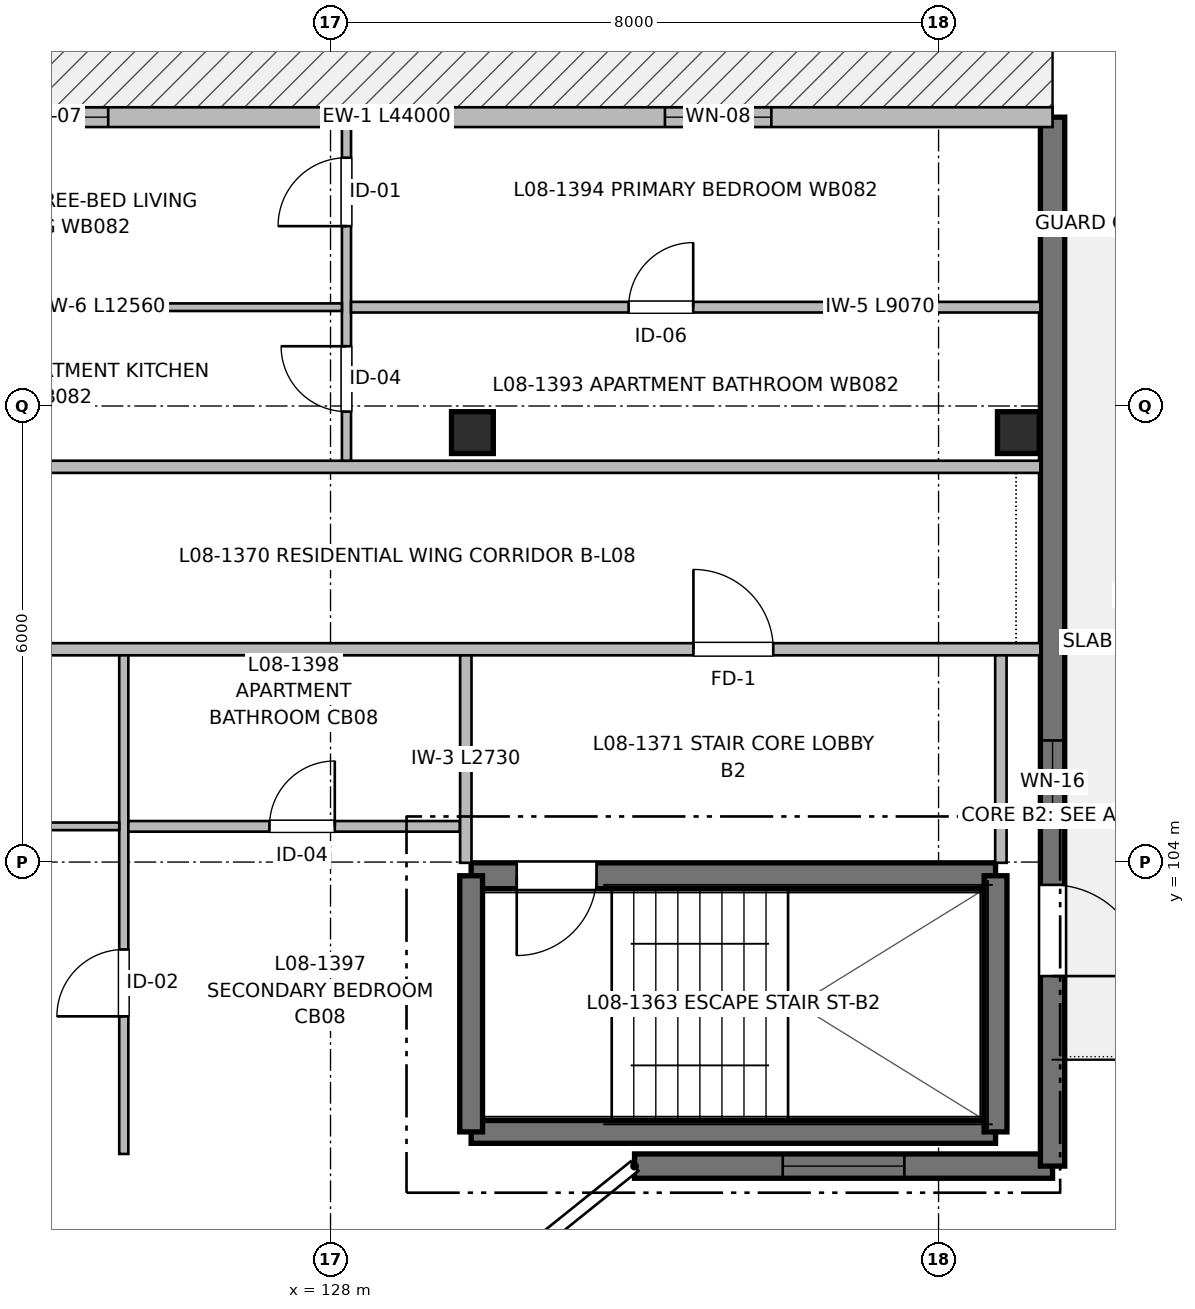
"""IFC4 building model, lengths in metres.
Left out: names, types, materials, properties, quantities, classifications, styles, units other than length and angle.
Written with IfcOpenShell. Run it as: python <this file> out.ifc"""

import sys

from ifc_helpers import new_model, si_unit, direction, frame, frame_2d, origin, origin_2d, place, context, subcontext, project, spatial, rectangle, extrude, element, fill, save


model = new_model("IFC4")
c1 = context("Model", 3, precision=1e-05, world=origin(), true_north=direction((0.0, 1.0)))
c2 = subcontext(c1, "Body", "Model", "MODEL_VIEW")
j1 = project(units=[si_unit("LENGTHUNIT", "METRE"), si_unit("PLANEANGLEUNIT", "RADIAN")], contexts=[c1])
p1 = place(None, origin())
s1 = spatial("IfcSite", under=j1, at=p1, CompositionType="ELEMENT")
p2 = place(p1, origin())
s2 = spatial("IfcBuilding", under=s1, at=p2, CompositionType="ELEMENT")
p3 = place(p2, frame((0.0, 0.0, 26.56)))
s3 = spatial("IfcBuildingStorey", under=s2, at=p3, CompositionType="ELEMENT", Elevation=26.56)
for number, where, z_axis, x_axis in (
    (1, (129.867, 109.65, 0.0), (0.0, 0.0, 1.0), (1.0, 0.0, 0.0)),
    (2, (137.05, 109.65, 0.0), (0.0, 0.0, 1.0), (1.0, 0.0, 0.0)),
):
    element("IfcColumn", number, at=place(p3, frame(where, z_axis=z_axis, x_axis=x_axis)), inside=s3, PredefinedType="COLUMN", context=c2, shape_type="SweptSolid", body=[
        extrude(rectangle(XDim=0.55, YDim=0.55, at=origin_2d()), origin(), (0.0, 0.0, 1.0), 3.2),
    ])
p4 = place(p3, frame((129.85, 100.45, 0.0), z_axis=(0.0, 0.0, 1.0), x_axis=(1.0, 0.0, 0.0)))
e3 = element("IfcWall", 3, at=p4, inside=s3, PredefinedType="SHEAR", context=c2, shape_type="SweptSolid", body=[
    extrude(rectangle(XDim=6.9, YDim=0.3, at=frame_2d((3.45, 0.0))), origin(), (0.0, 0.0, 1.0), 3.2),
])
p5 = place(p3, frame((136.75, 103.82, 0.0), z_axis=(0.0, 0.0, 1.0), x_axis=(-1.0, 0.0, 0.0)))
e4 = element("IfcWall", 4, at=p5, inside=s3, PredefinedType="SHEAR", context=c2, shape_type="SweptSolid", body=[
    extrude(rectangle(XDim=6.9, YDim=0.34, at=frame_2d((3.45, 0.0))), origin(), (0.0, 0.0, 1.0), 3.2),
])
p6 = place(p5, frame((5.25, 0.0, 0.0)))
e5 = element("IfcOpeningElement", 5, at=p6, cuts=e4, PredefinedType="OPENING", context=c2, shape_type="SweptSolid", body=[
    extrude(rectangle(XDim=1.05, YDim=2.15, at=frame_2d((0.525, 1.075))), frame((0.0, 0.18, 0.0), z_axis=(0.0, -1.0, 0.0), x_axis=(1.0, 0.0, 0.0)), (0.0, 0.0, 1.0), 0.36),
])
for number, where, z_axis, x_axis in (
    (6, (129.85, 103.82, 0.0), (0.0, 0.0, 1.0), (0.0, -1.0, 0.0)),
    (7, (136.75, 100.45, 0.0), (0.0, 0.0, 1.0), (0.0, 1.0, 0.0)),
):
    element("IfcWall", number, at=place(p3, frame(where, z_axis=z_axis, x_axis=x_axis)), inside=s3, PredefinedType="SHEAR", context=c2, shape_type="SweptSolid", body=[
        extrude(rectangle(XDim=3.37, YDim=0.3, at=frame_2d((1.685, 0.0))), origin(), (0.0, 0.0, 1.0), 3.2),
    ])
p7 = place(p3, frame((137.5, 100.0, 0.0), z_axis=(0.0, 0.0, 1.0), x_axis=(-1.0, 0.0, 0.0)))
e8 = element("IfcWall", 8, at=p7, inside=s3, PredefinedType="SHEAR", context=c2, shape_type="SweptSolid", body=[
    extrude(rectangle(XDim=5.5, YDim=0.32, at=frame_2d((2.75, 0.0))), origin(), (0.0, 0.0, 1.0), 2.98),
])
p8 = place(p7, frame((1.95, 0.0, 0.77)))
e9 = element("IfcOpeningElement", 9, at=p8, cuts=e8, PredefinedType="OPENING", context=c2, shape_type="SweptSolid", body=[
    extrude(rectangle(XDim=1.6, YDim=1.45, at=frame_2d((0.8, 0.725))), frame((0.0, 0.17, 0.0), z_axis=(0.0, -1.0, 0.0), x_axis=(1.0, 0.0, 0.0)), (0.0, 0.0, 1.0), 0.34),
])
p9 = place(p3, frame((137.5, 113.8, 0.0), z_axis=(0.0, 0.0, 1.0), x_axis=(0.0, -1.0, 0.0)))
e10 = element("IfcWall", 10, at=p9, inside=s3, PredefinedType="SHEAR", context=c2, shape_type="SweptSolid", body=[
    extrude(rectangle(XDim=13.8, YDim=0.32, at=frame_2d((6.9, 0.0))), origin(), (0.0, 0.0, 1.0), 2.98),
])
p10 = place(p9, frame((10.1, 0.0, 0.0)))
e11 = element("IfcOpeningElement", 11, at=p10, cuts=e10, PredefinedType="OPENING", context=c2, shape_type="SweptSolid", body=[
    extrude(rectangle(XDim=1.2, YDim=2.2, at=frame_2d((0.6, 1.1))), frame((0.0, 0.17, 0.0), z_axis=(0.0, -1.0, 0.0), x_axis=(1.0, 0.0, 0.0)), (0.0, 0.0, 1.0), 0.34),
])
p11 = place(p9, frame((8.2, 0.0, 0.62)))
e12 = element("IfcOpeningElement", 12, at=p11, cuts=e10, PredefinedType="OPENING", context=c2, shape_type="SweptSolid", body=[
    extrude(rectangle(XDim=1.1, YDim=1.6, at=frame_2d((0.55, 0.8))), frame((0.0, 0.17, 0.0), z_axis=(0.0, -1.0, 0.0), x_axis=(1.0, 0.0, 0.0)), (0.0, 0.0, 1.0), 0.34),
])
p12 = place(p3, frame((93.5, 113.8, 0.0), z_axis=(0.0, 0.0, 1.0), x_axis=(1.0, 0.0, 0.0)))
e13 = element("IfcWall", 13, at=p12, inside=s3, PredefinedType="SOLIDWALL", context=c2, shape_type="SweptSolid", body=[
    extrude(rectangle(XDim=44.0, YDim=0.26, at=frame_2d((22.0, 0.0))), origin(), (0.0, 0.0, 1.0), 2.98),
])
p13 = place(p12, frame((5.5, 0.0, 0.0)))
e14 = element("IfcOpeningElement", 14, at=p13, cuts=e13, PredefinedType="OPENING", context=c2, shape_type="SweptSolid", body=[
    extrude(rectangle(XDim=1.35, YDim=2.2, at=frame_2d((0.675, 1.1))), frame((0.0, 0.14, 0.0), z_axis=(0.0, -1.0, 0.0), x_axis=(1.0, 0.0, 0.0)), (0.0, 0.0, 1.0), 0.28),
])
p14 = place(p12, frame((3.6, 0.0, 0.77)))
e15 = element("IfcOpeningElement", 15, at=p14, cuts=e13, PredefinedType="OPENING", context=c2, shape_type="SweptSolid", body=[
    extrude(rectangle(XDim=1.6, YDim=1.45, at=frame_2d((0.8, 0.725))), frame((0.0, 0.14, 0.0), z_axis=(0.0, -1.0, 0.0), x_axis=(1.0, 0.0, 0.0)), (0.0, 0.0, 1.0), 0.28),
])
p15 = place(p12, frame((13.3, 0.0, 0.72)))
e16 = element("IfcOpeningElement", 16, at=p15, cuts=e13, PredefinedType="OPENING", context=c2, shape_type="SweptSolid", body=[
    extrude(rectangle(XDim=2.4, YDim=1.5, at=frame_2d((1.2, 0.75))), frame((0.0, 0.14, 0.0), z_axis=(0.0, -1.0, 0.0), x_axis=(1.0, 0.0, 0.0)), (0.0, 0.0, 1.0), 0.28),
])
p16 = place(p12, frame((22.55, 0.0, 0.82)))
e17 = element("IfcOpeningElement", 17, at=p16, cuts=e13, PredefinedType="OPENING", context=c2, shape_type="SweptSolid", body=[
    extrude(rectangle(XDim=1.5, YDim=1.4, at=frame_2d((0.75, 0.7))), frame((0.0, 0.14, 0.0), z_axis=(0.0, -1.0, 0.0), x_axis=(1.0, 0.0, 0.0)), (0.0, 0.0, 1.0), 0.28),
])
p17 = place(p12, frame((30.025, 0.0, 0.82)))
e18 = element("IfcOpeningElement", 18, at=p17, cuts=e13, PredefinedType="OPENING", context=c2, shape_type="SweptSolid", body=[
    extrude(rectangle(XDim=1.55, YDim=1.4, at=frame_2d((0.775, 0.7))), frame((0.0, 0.14, 0.0), z_axis=(0.0, -1.0, 0.0), x_axis=(1.0, 0.0, 0.0)), (0.0, 0.0, 1.0), 0.28),
])
p18 = place(p12, frame((38.9, 0.0, 0.87)))
e19 = element("IfcOpeningElement", 19, at=p18, cuts=e13, PredefinedType="OPENING", context=c2, shape_type="SweptSolid", body=[
    extrude(rectangle(XDim=1.4, YDim=1.35, at=frame_2d((0.7, 0.675))), frame((0.0, 0.14, 0.0), z_axis=(0.0, -1.0, 0.0), x_axis=(1.0, 0.0, 0.0)), (0.0, 0.0, 1.0), 0.28),
])
p19 = place(p3, frame((113.2, 106.8, 0.0), z_axis=(0.0, 0.0, 1.0), x_axis=(1.0, 0.0, 0.0)))
e20 = element("IfcWall", 20, at=p19, inside=s3, PredefinedType="PARTITIONING", context=c2, shape_type="SweptSolid", body=[
    extrude(rectangle(XDim=24.14, YDim=0.16, at=frame_2d((12.07, 0.0))), origin(), (0.0, 0.0, 1.0), 2.935),
])
p20 = place(p19, frame((19.575, 0.0, 0.0)))
e21 = element("IfcOpeningElement", 21, at=p20, cuts=e20, PredefinedType="OPENING", context=c2, shape_type="SweptSolid", body=[
    extrude(rectangle(XDim=1.05, YDim=2.15, at=frame_2d((0.525, 1.075))), frame((0.0, 0.09, 0.0), z_axis=(0.0, -1.0, 0.0), x_axis=(1.0, 0.0, 0.0)), (0.0, 0.0, 1.0), 0.18),
])
p21 = place(p19, frame((8.995, 0.0, 0.0)))
e22 = element("IfcOpeningElement", 22, at=p21, cuts=e20, PredefinedType="OPENING", context=c2, shape_type="SweptSolid", body=[
    extrude(rectangle(XDim=0.98, YDim=2.15, at=frame_2d((0.49, 1.075))), frame((0.0, 0.09, 0.0), z_axis=(0.0, -1.0, 0.0), x_axis=(1.0, 0.0, 0.0)), (0.0, 0.0, 1.0), 0.18),
])
p22 = place(p3, frame((93.66, 109.2, 0.0), z_axis=(0.0, 0.0, 1.0), x_axis=(1.0, 0.0, 0.0)))
e23 = element("IfcWall", 23, at=p22, inside=s3, PredefinedType="PARTITIONING", context=c2, shape_type="SweptSolid", body=[
    extrude(rectangle(XDim=43.68, YDim=0.16, at=frame_2d((21.84, 0.0))), origin(), (0.0, 0.0, 1.0), 2.935),
])
p23 = place(p22, frame((5.815, 0.0, 0.0)))
e24 = element("IfcOpeningElement", 24, at=p23, cuts=e23, PredefinedType="OPENING", context=c2, shape_type="SweptSolid", body=[
    extrude(rectangle(XDim=0.98, YDim=2.15, at=frame_2d((0.49, 1.075))), frame((0.0, 0.09, 0.0), z_axis=(0.0, -1.0, 0.0), x_axis=(1.0, 0.0, 0.0)), (0.0, 0.0, 1.0), 0.18),
])
p24 = place(p22, frame((27.35, 0.0, 0.0)))
e25 = element("IfcOpeningElement", 25, at=p24, cuts=e23, PredefinedType="OPENING", context=c2, shape_type="SweptSolid", body=[
    extrude(rectangle(XDim=0.98, YDim=2.15, at=frame_2d((0.49, 1.075))), frame((0.0, 0.09, 0.0), z_axis=(0.0, -1.0, 0.0), x_axis=(1.0, 0.0, 0.0)), (0.0, 0.0, 1.0), 0.18),
])
for number, where, z_axis, x_axis in (
    (26, (129.78, 103.99, 0.0), (0.0, 0.0, 1.0), (0.0, 1.0, 0.0)),
    (27, (136.82, 103.99, 0.0), (0.0, 0.0, 1.0), (0.0, 1.0, 0.0)),
):
    element("IfcWall", number, at=place(p3, frame(where, z_axis=z_axis, x_axis=x_axis)), inside=s3, PredefinedType="PARTITIONING", context=c2, shape_type="SweptSolid", body=[
        extrude(rectangle(XDim=2.73, YDim=0.15, at=frame_2d((1.365, 0.0))), origin(), (0.0, 0.0, 1.0), 2.935),
    ])
p25 = place(p3, frame((128.21, 109.28, 0.0), z_axis=(0.0, 0.0, 1.0), x_axis=(0.0, 1.0, 0.0)))
e28 = element("IfcWall", 28, at=p25, inside=s3, PredefinedType="PARTITIONING", context=c2, shape_type="SweptSolid", body=[
    extrude(rectangle(XDim=4.39, YDim=0.12, at=frame_2d((2.195, 0.0))), origin(), (0.0, 0.0, 1.0), 2.935),
])
p26 = place(p25, frame((0.646, 0.0, 0.0)))
e29 = element("IfcOpeningElement", 29, at=p26, cuts=e28, PredefinedType="OPENING", context=c2, shape_type="SweptSolid", body=[
    extrude(rectangle(XDim=0.86, YDim=2.1, at=frame_2d((0.43, 1.05))), frame((0.0, 0.07, 0.0), z_axis=(0.0, -1.0, 0.0), x_axis=(1.0, 0.0, 0.0)), (0.0, 0.0, 1.0), 0.14),
])
p27 = place(p25, frame((3.086, 0.0, 0.0)))
e30 = element("IfcOpeningElement", 30, at=p27, cuts=e28, PredefinedType="OPENING", context=c2, shape_type="SweptSolid", body=[
    extrude(rectangle(XDim=0.9, YDim=2.1, at=frame_2d((0.45, 1.05))), frame((0.0, 0.07, 0.0), z_axis=(0.0, -1.0, 0.0), x_axis=(1.0, 0.0, 0.0)), (0.0, 0.0, 1.0), 0.14),
])
p28 = place(p3, frame((128.27, 111.3, 0.0), z_axis=(0.0, 0.0, 1.0), x_axis=(1.0, 0.0, 0.0)))
e31 = element("IfcWall", 31, at=p28, inside=s3, PredefinedType="PARTITIONING", context=c2, shape_type="SweptSolid", body=[
    extrude(rectangle(XDim=9.07, YDim=0.14, at=frame_2d((4.535, 0.0))), origin(), (0.0, 0.0, 1.0), 2.935),
])
p29 = place(p28, frame((3.652, 0.0, 0.0)))
e32 = element("IfcOpeningElement", 32, at=p29, cuts=e31, PredefinedType="OPENING", context=c2, shape_type="SweptSolid", body=[
    extrude(rectangle(XDim=0.85, YDim=2.05, at=frame_2d((0.425, 1.025))), frame((0.0, 0.08, 0.0), z_axis=(0.0, -1.0, 0.0), x_axis=(1.0, 0.0, 0.0)), (0.0, 0.0, 1.0), 0.16),
])
p30 = place(p3, frame((115.59, 111.3, 0.0), z_axis=(0.0, 0.0, 1.0), x_axis=(1.0, 0.0, 0.0)))
e33 = element("IfcWall", 33, at=p30, inside=s3, PredefinedType="PARTITIONING", context=c2, shape_type="SweptSolid", body=[
    extrude(rectangle(XDim=12.56, YDim=0.1, at=frame_2d((6.28, 0.0))), origin(), (0.0, 0.0, 1.0), 2.935),
])
p31 = place(p30, frame((5.048, 0.0, 0.0)))
e34 = element("IfcOpeningElement", 34, at=p31, cuts=e33, PredefinedType="OPENING", context=c2, shape_type="SweptSolid", body=[
    extrude(rectangle(XDim=0.92, YDim=2.1, at=frame_2d((0.46, 1.05))), frame((0.0, 0.06, 0.0), z_axis=(0.0, -1.0, 0.0), x_axis=(1.0, 0.0, 0.0)), (0.0, 0.0, 1.0), 0.12),
])
p32 = place(p3, frame((125.28, 100.16, 0.0), z_axis=(0.0, 0.0, 1.0), x_axis=(0.0, 1.0, 0.0)))
e35 = element("IfcWall", 35, at=p32, inside=s3, PredefinedType="PARTITIONING", context=c2, shape_type="SweptSolid", body=[
    extrude(rectangle(XDim=6.56, YDim=0.12, at=frame_2d((3.28, 0.0))), origin(), (0.0, 0.0, 1.0), 2.935),
])
p33 = place(p32, frame((1.81, 0.0, 0.0)))
e36 = element("IfcOpeningElement", 36, at=p33, cuts=e35, PredefinedType="OPENING", context=c2, shape_type="SweptSolid", body=[
    extrude(rectangle(XDim=0.88, YDim=2.1, at=frame_2d((0.44, 1.05))), frame((0.0, 0.07, 0.0), z_axis=(0.0, -1.0, 0.0), x_axis=(1.0, 0.0, 0.0)), (0.0, 0.0, 1.0), 0.14),
])
p34 = place(p3, frame((125.34, 104.47, 0.0), z_axis=(0.0, 0.0, 1.0), x_axis=(1.0, 0.0, 0.0)))
e37 = element("IfcWall", 37, at=p34, inside=s3, PredefinedType="PARTITIONING", context=c2, shape_type="SweptSolid", body=[
    extrude(rectangle(XDim=4.36, YDim=0.14, at=frame_2d((2.18, 0.0))), origin(), (0.0, 0.0, 1.0), 2.935),
])
p35 = place(p34, frame((1.856, 0.0, 0.0)))
e38 = element("IfcOpeningElement", 38, at=p35, cuts=e37, PredefinedType="OPENING", context=c2, shape_type="SweptSolid", body=[
    extrude(rectangle(XDim=0.86, YDim=2.1, at=frame_2d((0.43, 1.05))), frame((0.0, 0.08, 0.0), z_axis=(0.0, -1.0, 0.0), x_axis=(1.0, 0.0, 0.0)), (0.0, 0.0, 1.0), 0.16),
])
p36 = place(p3, frame((120.09, 104.47, 0.0), z_axis=(0.0, 0.0, 1.0), x_axis=(1.0, 0.0, 0.0)))
e39 = element("IfcWall", 39, at=p36, inside=s3, PredefinedType="PARTITIONING", context=c2, shape_type="SweptSolid", body=[
    extrude(rectangle(XDim=5.13, YDim=0.1, at=frame_2d((2.565, 0.0))), origin(), (0.0, 0.0, 1.0), 2.935),
])
p37 = place(p36, frame((2.18, 0.0, 0.0)))
e40 = element("IfcOpeningElement", 40, at=p37, cuts=e39, PredefinedType="OPENING", context=c2, shape_type="SweptSolid", body=[
    extrude(rectangle(XDim=0.92, YDim=2.1, at=frame_2d((0.46, 1.05))), frame((0.0, 0.06, 0.0), z_axis=(0.0, -1.0, 0.0), x_axis=(1.0, 0.0, 0.0)), (0.0, 0.0, 1.0), 0.12),
])
p38 = place(p6, origin())
e41 = element("IfcDoor", 41, at=p38, inside=s3, OperationType="SINGLE_SWING_RIGHT", PredefinedType="DOOR", context=c2, shape_type="SweptSolid", body=[
    extrude(rectangle(XDim=1.05, YDim=2.15, at=frame_2d((0.525, 1.075))), frame((0.0, 0.025, 0.0), z_axis=(0.0, -1.0, 0.0), x_axis=(1.0, 0.0, 0.0)), (0.0, 0.0, 1.0), 0.05),
])
fill(e5, e41)
p39 = place(p8, origin())
e42 = element("IfcWindow", 42, at=p39, inside=s3, PartitioningType="SINGLE_PANEL", PredefinedType="WINDOW", context=c2, shape_type="SweptSolid", body=[
    extrude(rectangle(XDim=1.6, YDim=1.45, at=frame_2d((0.8, 0.725))), frame((0.0, 0.03, 0.0), z_axis=(0.0, -1.0, 0.0), x_axis=(1.0, 0.0, 0.0)), (0.0, 0.0, 1.0), 0.06),
])
fill(e9, e42)
p40 = place(p10, origin())
e43 = element("IfcDoor", 43, at=p40, inside=s3, OperationType="SINGLE_SWING_RIGHT", PredefinedType="DOOR", context=c2, shape_type="SweptSolid", body=[
    extrude(rectangle(XDim=1.2, YDim=2.2, at=frame_2d((0.6, 1.1))), frame((0.0, 0.025, 0.0), z_axis=(0.0, -1.0, 0.0), x_axis=(1.0, 0.0, 0.0)), (0.0, 0.0, 1.0), 0.05),
])
fill(e11, e43)
p41 = place(p11, origin())
e44 = element("IfcWindow", 44, at=p41, inside=s3, PartitioningType="SINGLE_PANEL", PredefinedType="WINDOW", context=c2, shape_type="SweptSolid", body=[
    extrude(rectangle(XDim=1.1, YDim=1.6, at=frame_2d((0.55, 0.8))), frame((0.0, 0.03, 0.0), z_axis=(0.0, -1.0, 0.0), x_axis=(1.0, 0.0, 0.0)), (0.0, 0.0, 1.0), 0.06),
])
fill(e12, e44)
p42 = place(p17, origin())
e45 = element("IfcWindow", 45, at=p42, inside=s3, PartitioningType="SINGLE_PANEL", PredefinedType="WINDOW", context=c2, shape_type="SweptSolid", body=[
    extrude(rectangle(XDim=1.55, YDim=1.4, at=frame_2d((0.775, 0.7))), frame((0.0, 0.03, 0.0), z_axis=(0.0, -1.0, 0.0), x_axis=(1.0, 0.0, 0.0)), (0.0, 0.0, 1.0), 0.06),
])
fill(e18, e45)
p43 = place(p18, origin())
e46 = element("IfcWindow", 46, at=p43, inside=s3, PartitioningType="SINGLE_PANEL", PredefinedType="WINDOW", context=c2, shape_type="SweptSolid", body=[
    extrude(rectangle(XDim=1.4, YDim=1.35, at=frame_2d((0.7, 0.675))), frame((0.0, 0.03, 0.0), z_axis=(0.0, -1.0, 0.0), x_axis=(1.0, 0.0, 0.0)), (0.0, 0.0, 1.0), 0.06),
])
fill(e19, e46)
p44 = place(p20, origin())
e47 = element("IfcDoor", 47, at=p44, inside=s3, OperationType="SINGLE_SWING_LEFT", PredefinedType="DOOR", context=c2, shape_type="SweptSolid", body=[
    extrude(rectangle(XDim=1.05, YDim=2.15, at=frame_2d((0.525, 1.075))), frame((0.0, 0.025, 0.0), z_axis=(0.0, -1.0, 0.0), x_axis=(1.0, 0.0, 0.0)), (0.0, 0.0, 1.0), 0.05),
])
fill(e21, e47)
p45 = place(p26, origin())
e48 = element("IfcDoor", 48, at=p45, inside=s3, OperationType="SINGLE_SWING_RIGHT", PredefinedType="DOOR", context=c2, shape_type="SweptSolid", body=[
    extrude(rectangle(XDim=0.86, YDim=2.1, at=frame_2d((0.43, 1.05))), frame((0.0, 0.025, 0.0), z_axis=(0.0, -1.0, 0.0), x_axis=(1.0, 0.0, 0.0)), (0.0, 0.0, 1.0), 0.05),
])
fill(e29, e48)
p46 = place(p27, origin())
e49 = element("IfcDoor", 49, at=p46, inside=s3, OperationType="SINGLE_SWING_LEFT", PredefinedType="DOOR", context=c2, shape_type="SweptSolid", body=[
    extrude(rectangle(XDim=0.9, YDim=2.1, at=frame_2d((0.45, 1.05))), frame((0.0, 0.025, 0.0), z_axis=(0.0, -1.0, 0.0), x_axis=(1.0, 0.0, 0.0)), (0.0, 0.0, 1.0), 0.05),
])
fill(e30, e49)
p47 = place(p29, origin())
e50 = element("IfcDoor", 50, at=p47, inside=s3, OperationType="SINGLE_SWING_RIGHT", PredefinedType="DOOR", context=c2, shape_type="SweptSolid", body=[
    extrude(rectangle(XDim=0.85, YDim=2.05, at=frame_2d((0.425, 1.025))), frame((0.0, 0.025, 0.0), z_axis=(0.0, -1.0, 0.0), x_axis=(1.0, 0.0, 0.0)), (0.0, 0.0, 1.0), 0.05),
])
fill(e32, e50)
p48 = place(p33, origin())
e51 = element("IfcDoor", 51, at=p48, inside=s3, OperationType="SINGLE_SWING_LEFT", PredefinedType="DOOR", context=c2, shape_type="SweptSolid", body=[
    extrude(rectangle(XDim=0.88, YDim=2.1, at=frame_2d((0.44, 1.05))), frame((0.0, 0.025, 0.0), z_axis=(0.0, -1.0, 0.0), x_axis=(1.0, 0.0, 0.0)), (0.0, 0.0, 1.0), 0.05),
])
fill(e36, e51)
p49 = place(p35, origin())
e52 = element("IfcDoor", 52, at=p49, inside=s3, OperationType="SINGLE_SWING_RIGHT", PredefinedType="DOOR", context=c2, shape_type="SweptSolid", body=[
    extrude(rectangle(XDim=0.86, YDim=2.1, at=frame_2d((0.43, 1.05))), frame((0.0, 0.025, 0.0), z_axis=(0.0, -1.0, 0.0), x_axis=(1.0, 0.0, 0.0)), (0.0, 0.0, 1.0), 0.05),
])
fill(e38, e52)
save(model, sys.argv[1])
